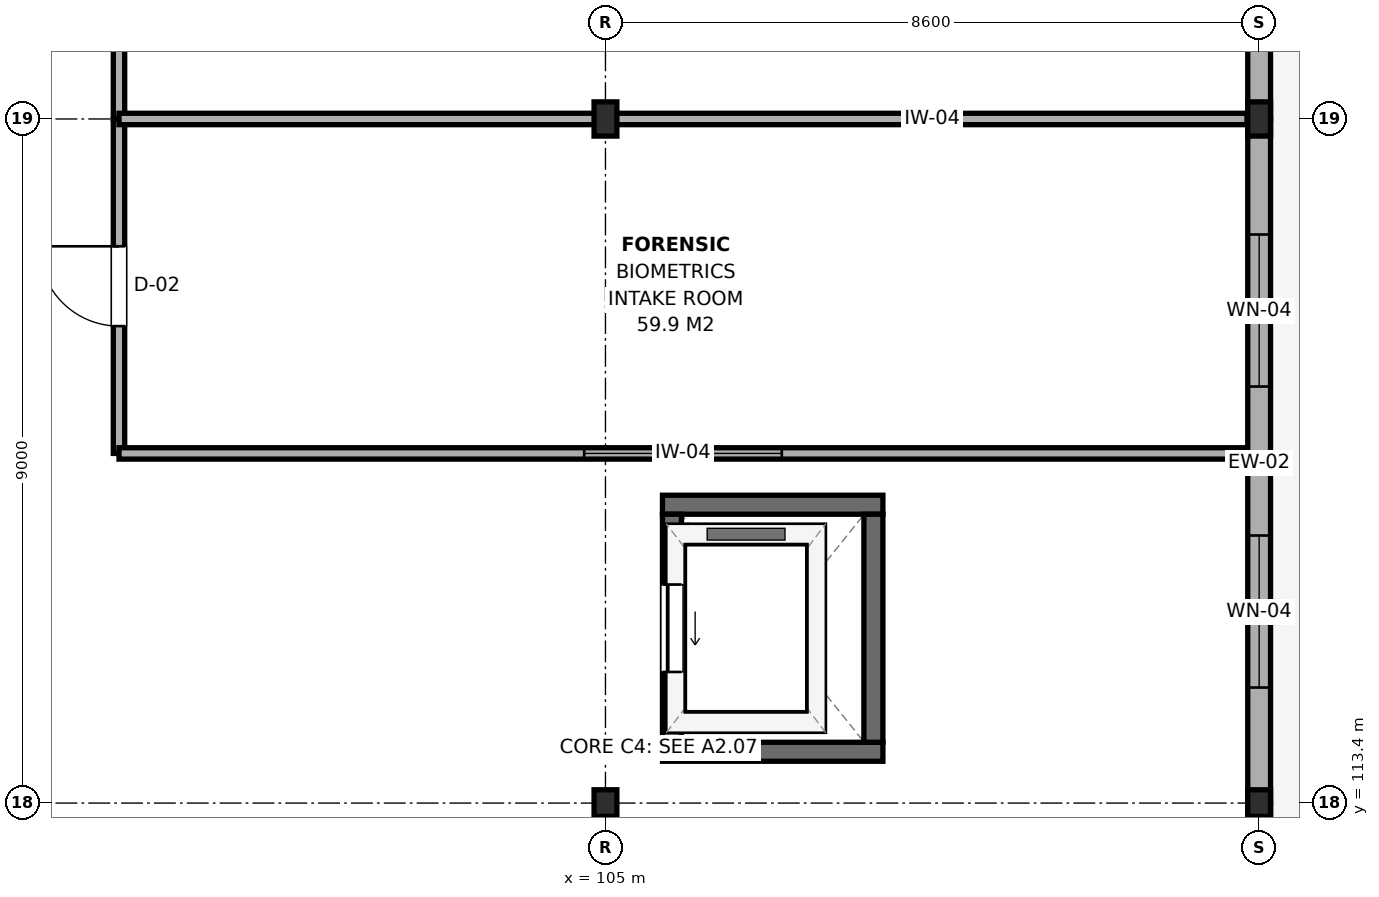
"""IFC4 building model, lengths in metres.
Left out: names, types, materials, properties, quantities, classifications, styles, units other than length and angle.
Written with IfcOpenShell. Run it as: python <this file> out.ifc"""

import sys

from ifc_helpers import new_model, si_unit, direction, frame, frame_2d, origin, origin_2d, place, context, subcontext, project, spatial, rectangle, i_section, extrude, element, fill, save


model = new_model("IFC4")
c1 = context("Model", 3, precision=1e-05, world=origin(), true_north=direction((0.0, 1.0)))
c2 = subcontext(c1, "Body", "Model", "MODEL_VIEW")
j1 = project(units=[si_unit("LENGTHUNIT", "METRE"), si_unit("PLANEANGLEUNIT", "RADIAN")], contexts=[c1])
p1 = place(None, origin())
s1 = spatial("IfcSite", under=j1, at=p1, CompositionType="ELEMENT")
p2 = place(p1, origin())
s2 = spatial("IfcBuilding", under=s1, at=p2, CompositionType="ELEMENT")
p3 = place(p2, frame((0.0, 0.0, 9.0)))
s3 = spatial("IfcBuildingStorey", under=s2, at=p3, CompositionType="ELEMENT", Elevation=9.0)
p4 = place(p3, frame((105.0, 113.4, 0.0), z_axis=(0.0, 0.0, 1.0), x_axis=(1.0, 0.0, 0.0)))
e1 = element("IfcColumn", 1, at=p4, inside=s3, PredefinedType="COLUMN", context=c2, shape_type="SweptSolid", body=[
    extrude(i_section(OverallWidth=0.3, OverallDepth=0.35, WebThickness=0.01, FlangeThickness=0.018, FilletRadius=0.027, at=origin_2d()), origin(), (0.0, 0.0, 1.0), 3.98),
])
p5 = place(p3, frame((105.0, 122.4, 0.0), z_axis=(0.0, 0.0, 1.0), x_axis=(1.0, 0.0, 0.0)))
e2 = element("IfcColumn", 2, at=p5, inside=s3, PredefinedType="COLUMN", context=c2, shape_type="SweptSolid", body=[
    extrude(i_section(OverallWidth=0.3, OverallDepth=0.45, WebThickness=0.014, FlangeThickness=0.026, FilletRadius=0.027, at=origin_2d()), origin(), (0.0, 0.0, 1.0), 4.2),
])
p6 = place(p3, frame((113.6, 113.4, 0.0), z_axis=(0.0, 0.0, 1.0), x_axis=(1.0, 0.0, 0.0)))
e3 = element("IfcColumn", 3, at=p6, inside=s3, PredefinedType="COLUMN", context=c2, shape_type="SweptSolid", body=[
    extrude(i_section(OverallWidth=0.3, OverallDepth=0.35, WebThickness=0.01, FlangeThickness=0.018, FilletRadius=0.027, at=origin_2d()), origin(), (0.0, 0.0, 1.0), 3.98),
])
p7 = place(p3, frame((113.6, 122.4, 0.0), z_axis=(0.0, 0.0, 1.0), x_axis=(1.0, 0.0, 0.0)))
e4 = element("IfcColumn", 4, at=p7, inside=s3, PredefinedType="COLUMN", context=c2, shape_type="SweptSolid", body=[
    extrude(i_section(OverallWidth=0.3, OverallDepth=0.45, WebThickness=0.014, FlangeThickness=0.026, FilletRadius=0.027, at=origin_2d()), origin(), (0.0, 0.0, 1.0), 4.2),
])
for number, where, z_axis, x_axis in (
    (5, (105.75, 114.075, 0.0), (0.0, 0.0, 1.0), (1.0, 0.0, 0.0)),
    (6, (105.75, 117.325, 0.0), (0.0, 0.0, 1.0), (1.0, 0.0, 0.0)),
):
    element("IfcWall", number, at=place(p3, frame(where, z_axis=z_axis, x_axis=x_axis)), inside=s3, PredefinedType="SHEAR", context=c2, shape_type="SweptSolid", body=[
        extrude(rectangle(XDim=2.9, YDim=0.25, at=frame_2d((1.45, 0.0))), origin(), (0.0, 0.0, 1.0), 3.98),
    ])
p8 = place(p3, frame((105.875, 114.2, 0.0), z_axis=(0.0, 0.0, 1.0), x_axis=(0.0, 1.0, 0.0)))
e7 = element("IfcWall", 7, at=p8, inside=s3, PredefinedType="SHEAR", context=c2, shape_type="SweptSolid", body=[
    extrude(rectangle(XDim=3.0, YDim=0.25, at=frame_2d((1.5, 0.0))), origin(), (0.0, 0.0, 1.0), 3.98),
])
p9 = place(p8, frame((0.925, 0.0, 0.0)))
e8 = element("IfcOpeningElement", 8, at=p9, cuts=e7, PredefinedType="OPENING", context=c2, shape_type="SweptSolid", body=[
    extrude(rectangle(XDim=1.15, YDim=2.15, at=frame_2d((0.575, 1.075))), frame((0.0, 0.14, 0.0), z_axis=(0.0, -1.0, 0.0), x_axis=(1.0, 0.0, 0.0)), (0.0, 0.0, 1.0), 0.28),
])
p10 = place(p3, frame((108.525, 114.2, 0.0), z_axis=(0.0, 0.0, 1.0), x_axis=(0.0, 1.0, 0.0)))
e9 = element("IfcWall", 9, at=p10, inside=s3, PredefinedType="SHEAR", context=c2, shape_type="SweptSolid", body=[
    extrude(rectangle(XDim=3.0, YDim=0.25, at=frame_2d((1.5, 0.0))), origin(), (0.0, 0.0, 1.0), 3.98),
])
p11 = place(p3, frame((113.6, 104.4, 0.0), z_axis=(0.0, 0.0, 1.0), x_axis=(0.0, 1.0, 0.0)))
e10 = element("IfcWall", 10, at=p11, inside=s3, PredefinedType="SOLIDWALL", context=c2, shape_type="SweptSolid", body=[
    extrude(rectangle(XDim=9.0, YDim=0.3, at=frame_2d((4.5, 0.0))), origin(), (0.0, 0.0, 1.0), 3.485),
])
p12 = place(p11, frame((1.52, 0.0, 1.1)))
e11 = element("IfcOpeningElement", 11, at=p12, cuts=e10, PredefinedType="OPENING", context=c2, shape_type="SweptSolid", body=[
    extrude(rectangle(XDim=2.0, YDim=1.8, at=frame_2d((1.0, 0.9))), frame((0.0, 0.165, 0.0), z_axis=(0.0, -1.0, 0.0), x_axis=(1.0, 0.0, 0.0)), (0.0, 0.0, 1.0), 0.33),
])
p13 = place(p11, frame((5.48, 0.0, 1.1)))
e12 = element("IfcOpeningElement", 12, at=p13, cuts=e10, PredefinedType="OPENING", context=c2, shape_type="SweptSolid", body=[
    extrude(rectangle(XDim=2.0, YDim=1.8, at=frame_2d((1.0, 0.9))), frame((0.0, 0.165, 0.0), z_axis=(0.0, -1.0, 0.0), x_axis=(1.0, 0.0, 0.0)), (0.0, 0.0, 1.0), 0.33),
])
p14 = place(p3, frame((113.6, 113.4, 0.0), z_axis=(0.0, 0.0, 1.0), x_axis=(0.0, 1.0, 0.0)))
e13 = element("IfcWall", 13, at=p14, inside=s3, PredefinedType="SOLIDWALL", context=c2, shape_type="SweptSolid", body=[
    extrude(rectangle(XDim=9.0, YDim=0.3, at=frame_2d((4.5, 0.0))), origin(), (0.0, 0.0, 1.0), 3.535),
])
p15 = place(p14, frame((1.52, 0.0, 1.1)))
e14 = element("IfcOpeningElement", 14, at=p15, cuts=e13, PredefinedType="OPENING", context=c2, shape_type="SweptSolid", body=[
    extrude(rectangle(XDim=2.0, YDim=1.8, at=frame_2d((1.0, 0.9))), frame((0.0, 0.165, 0.0), z_axis=(0.0, -1.0, 0.0), x_axis=(1.0, 0.0, 0.0)), (0.0, 0.0, 1.0), 0.33),
])
p16 = place(p14, frame((5.48, 0.0, 1.1)))
e15 = element("IfcOpeningElement", 15, at=p16, cuts=e13, PredefinedType="OPENING", context=c2, shape_type="SweptSolid", body=[
    extrude(rectangle(XDim=2.0, YDim=1.8, at=frame_2d((1.0, 0.9))), frame((0.0, 0.165, 0.0), z_axis=(0.0, -1.0, 0.0), x_axis=(1.0, 0.0, 0.0)), (0.0, 0.0, 1.0), 0.33),
])
p17 = place(p3, frame((113.6, 122.4, 0.0), z_axis=(0.0, 0.0, 1.0), x_axis=(0.0, 1.0, 0.0)))
e16 = element("IfcWall", 16, at=p17, inside=s3, PredefinedType="SOLIDWALL", context=c2, shape_type="SweptSolid", body=[
    extrude(rectangle(XDim=8.4, YDim=0.3, at=frame_2d((4.2, 0.0))), origin(), (0.0, 0.0, 1.0), 3.585),
])
p18 = place(p17, frame((1.352, 0.0, 1.1)))
e17 = element("IfcOpeningElement", 17, at=p18, cuts=e16, PredefinedType="OPENING", context=c2, shape_type="SweptSolid", body=[
    extrude(rectangle(XDim=2.0, YDim=1.8, at=frame_2d((1.0, 0.9))), frame((0.0, 0.165, 0.0), z_axis=(0.0, -1.0, 0.0), x_axis=(1.0, 0.0, 0.0)), (0.0, 0.0, 1.0), 0.33),
])
p19 = place(p17, frame((5.048, 0.0, 1.1)))
e18 = element("IfcOpeningElement", 18, at=p19, cuts=e16, PredefinedType="OPENING", context=c2, shape_type="SweptSolid", body=[
    extrude(rectangle(XDim=2.0, YDim=1.8, at=frame_2d((1.0, 0.9))), frame((0.0, 0.165, 0.0), z_axis=(0.0, -1.0, 0.0), x_axis=(1.0, 0.0, 0.0)), (0.0, 0.0, 1.0), 0.33),
])
p20 = place(p3, frame((98.6, 118.0, 0.0), z_axis=(0.0, 0.0, 1.0), x_axis=(0.0, 1.0, 0.0)))
e19 = element("IfcWall", 19, at=p20, inside=s3, PredefinedType="PARTITIONING", context=c2, shape_type="SweptSolid", body=[
    extrude(rectangle(XDim=4.4, YDim=0.15, at=frame_2d((2.2, 0.0))), origin(), (0.0, 0.0, 1.0), 3.385),
])
p21 = place(p20, frame((1.675, 0.0, 0.0)))
e20 = element("IfcOpeningElement", 20, at=p21, cuts=e19, PredefinedType="OPENING", context=c2, shape_type="SweptSolid", body=[
    extrude(rectangle(XDim=1.05, YDim=2.15, at=frame_2d((0.525, 1.075))), frame((0.0, 0.09, 0.0), z_axis=(0.0, -1.0, 0.0), x_axis=(1.0, 0.0, 0.0)), (0.0, 0.0, 1.0), 0.18),
])
p22 = place(p3, frame((98.6, 118.0, 0.0), z_axis=(0.0, 0.0, 1.0), x_axis=(1.0, 0.0, 0.0)))
e21 = element("IfcWall", 21, at=p22, inside=s3, PredefinedType="PARTITIONING", context=c2, shape_type="SweptSolid", body=[
    extrude(rectangle(XDim=14.84, YDim=0.15, at=frame_2d((7.42, 0.0))), origin(), (0.0, 0.0, 1.0), 3.435),
])
p23 = place(p22, frame((6.12, 0.0, 0.95)))
e22 = element("IfcOpeningElement", 22, at=p23, cuts=e21, PredefinedType="OPENING", context=c2, shape_type="SweptSolid", body=[
    extrude(rectangle(XDim=2.6, YDim=1.5, at=frame_2d((1.3, 0.75))), frame((0.0, 0.09, 0.0), z_axis=(0.0, -1.0, 0.0), x_axis=(1.0, 0.0, 0.0)), (0.0, 0.0, 1.0), 0.18),
])
p24 = place(p3, frame((98.6, 122.4, 0.0), z_axis=(0.0, 0.0, 1.0), x_axis=(0.0, 1.0, 0.0)))
e23 = element("IfcWall", 23, at=p24, inside=s3, PredefinedType="PARTITIONING", context=c2, shape_type="SweptSolid", body=[
    extrude(rectangle(XDim=8.8, YDim=0.15, at=frame_2d((4.4, 0.0))), origin(), (0.0, 0.0, 1.0), 3.385),
])
p25 = place(p24, frame((3.9, 0.0, 0.0)))
e24 = element("IfcOpeningElement", 24, at=p25, cuts=e23, PredefinedType="OPENING", context=c2, shape_type="SweptSolid", body=[
    extrude(rectangle(XDim=1.0, YDim=2.15, at=frame_2d((0.5, 1.075))), frame((0.0, 0.09, 0.0), z_axis=(0.0, -1.0, 0.0), x_axis=(1.0, 0.0, 0.0)), (0.0, 0.0, 1.0), 0.18),
])
p26 = place(p3, frame((98.6, 122.4, 0.0), z_axis=(0.0, 0.0, 1.0), x_axis=(1.0, 0.0, 0.0)))
e25 = element("IfcWall", 25, at=p26, inside=s3, PredefinedType="PARTITIONING", context=c2, shape_type="SweptSolid", body=[
    extrude(rectangle(XDim=14.84, YDim=0.15, at=frame_2d((7.42, 0.0))), origin(), (0.0, 0.0, 1.0), 3.385),
])
p27 = place(p15, origin())
e26 = element("IfcWindow", 26, at=p27, inside=s3, PartitioningType="SINGLE_PANEL", PredefinedType="WINDOW", context=c2, shape_type="SweptSolid", body=[
    extrude(rectangle(XDim=2.0, YDim=1.8, at=frame_2d((1.0, 0.9))), frame((0.0, 0.03, 0.0), z_axis=(0.0, -1.0, 0.0), x_axis=(1.0, 0.0, 0.0)), (0.0, 0.0, 1.0), 0.06),
])
fill(e14, e26)
p28 = place(p16, origin())
e27 = element("IfcWindow", 27, at=p28, inside=s3, PartitioningType="SINGLE_PANEL", PredefinedType="WINDOW", context=c2, shape_type="SweptSolid", body=[
    extrude(rectangle(XDim=2.0, YDim=1.8, at=frame_2d((1.0, 0.9))), frame((0.0, 0.03, 0.0), z_axis=(0.0, -1.0, 0.0), x_axis=(1.0, 0.0, 0.0)), (0.0, 0.0, 1.0), 0.06),
])
fill(e15, e27)
p29 = place(p9, origin())
e28 = element("IfcDoor", 28, at=p29, inside=s3, OperationType="SLIDING_TO_LEFT", PredefinedType="DOOR", context=c2, shape_type="SweptSolid", body=[
    extrude(rectangle(XDim=1.15, YDim=2.15, at=frame_2d((0.575, 1.075))), frame((0.0, 0.025, 0.0), z_axis=(0.0, -1.0, 0.0), x_axis=(1.0, 0.0, 0.0)), (0.0, 0.0, 1.0), 0.05),
])
fill(e8, e28)
p30 = place(p21, origin())
e29 = element("IfcDoor", 29, at=p30, inside=s3, OperationType="SINGLE_SWING_RIGHT", PredefinedType="DOOR", context=c2, shape_type="SweptSolid", body=[
    extrude(rectangle(XDim=1.05, YDim=2.15, at=frame_2d((0.525, 1.075))), frame((0.0, 0.025, 0.0), z_axis=(0.0, -1.0, 0.0), x_axis=(1.0, 0.0, 0.0)), (0.0, 0.0, 1.0), 0.05),
])
fill(e20, e29)
p31 = place(p23, origin())
e30 = element("IfcWindow", 30, at=p31, inside=s3, PartitioningType="SINGLE_PANEL", PredefinedType="WINDOW", context=c2, shape_type="SweptSolid", body=[
    extrude(rectangle(XDim=2.6, YDim=1.5, at=frame_2d((1.3, 0.75))), frame((0.0, 0.03, 0.0), z_axis=(0.0, -1.0, 0.0), x_axis=(1.0, 0.0, 0.0)), (0.0, 0.0, 1.0), 0.06),
])
fill(e22, e30)
save(model, sys.argv[1])
